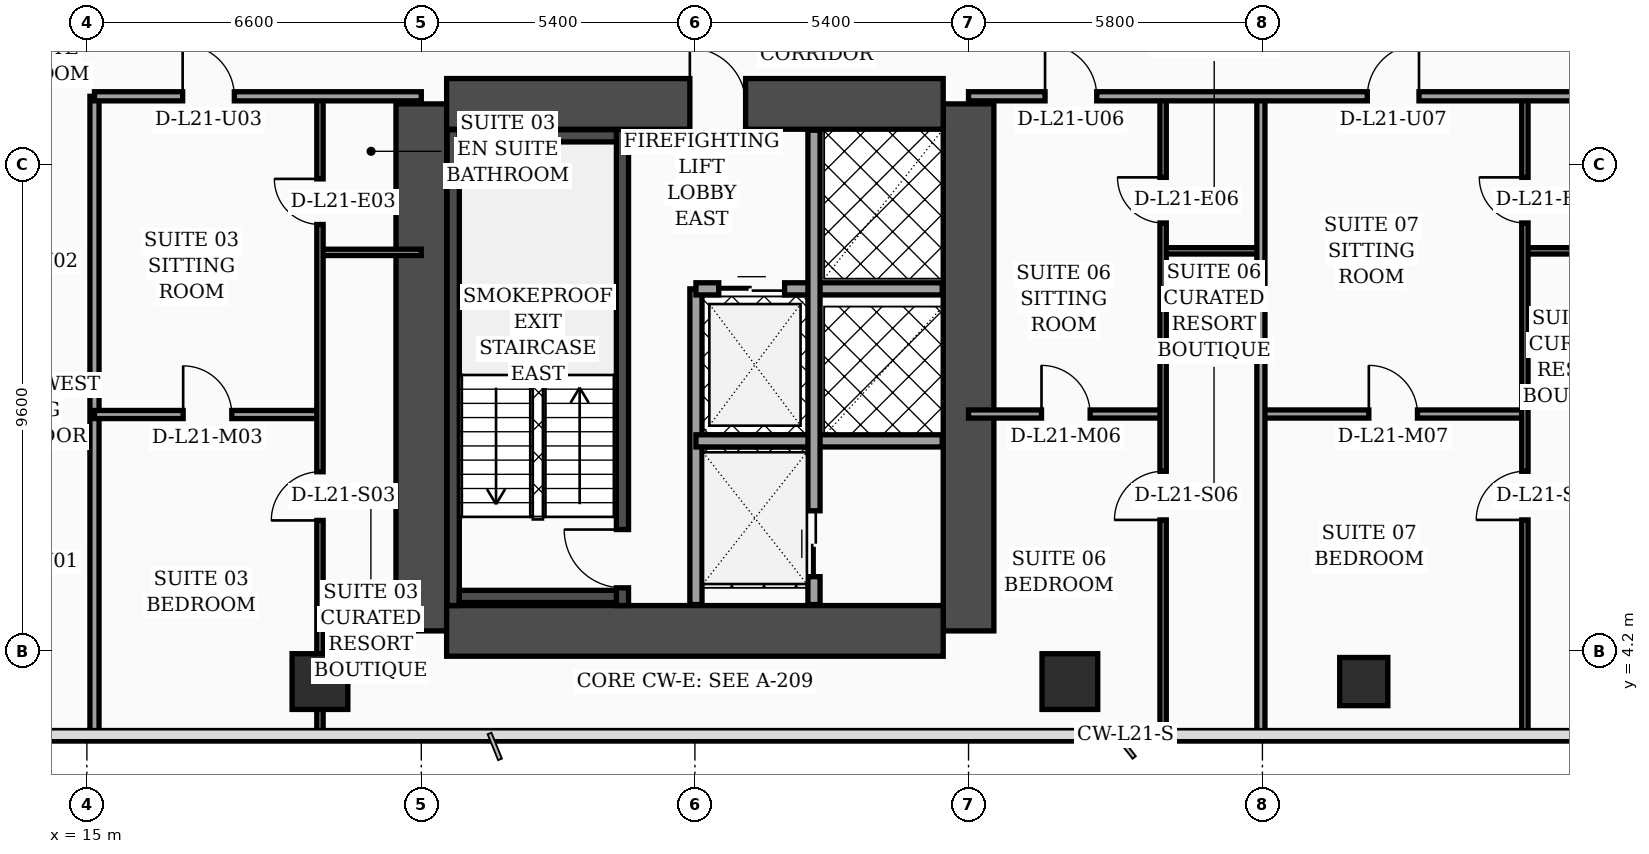
"""IFC4 building model, lengths in metres.
Left out: names, types, materials, properties, quantities, classifications, styles, units other than length and angle.
Written with IfcOpenShell. Run it as: python <this file> out.ifc"""

import sys

from ifc_helpers import new_model, si_unit, direction, frame, frame_2d, origin, origin_2d, place, context, subcontext, project, spatial, rectangle, hollow_rectangle, extrude, element, fill, save


model = new_model("IFC4")
c1 = context("Model", 3, precision=1e-05, world=origin(), true_north=direction((0.0, 1.0)))
c2 = subcontext(c1, "Body", "Model", "MODEL_VIEW")
j1 = project(units=[si_unit("LENGTHUNIT", "METRE"), si_unit("PLANEANGLEUNIT", "RADIAN")], contexts=[c1])
p1 = place(None, origin())
s1 = spatial("IfcSite", under=j1, at=p1, CompositionType="ELEMENT")
p2 = place(p1, origin())
s2 = spatial("IfcBuilding", under=s1, at=p2, CompositionType="ELEMENT")
p3 = place(p2, frame((0.0, 0.0, 88.8)))
s3 = spatial("IfcBuildingStorey", under=s2, at=p3, CompositionType="ELEMENT", Elevation=88.8)
for number, where, z_axis, x_axis in (
    (1, (21.6, 4.6, 0.0), (0.0, 0.0, 1.0), (0.0, 1.0, 0.0)),
    (2, (32.4, 4.6, 0.0), (0.0, 0.0, 1.0), (0.0, 1.0, 0.0)),
):
    element("IfcWall", number, at=place(p3, frame(where, z_axis=z_axis, x_axis=x_axis)), inside=s3, PredefinedType="SHEAR", context=c2, shape_type="SweptSolid", body=[
        extrude(rectangle(XDim=10.4, YDim=1.0, at=frame_2d((5.2, 0.0))), origin(), (0.0, 0.0, 1.0), 3.52),
    ])
p4 = place(p3, frame((22.1, 15.0, 0.0), z_axis=(0.0, 0.0, 1.0), x_axis=(1.0, 0.0, 0.0)))
e3 = element("IfcWall", 3, at=p4, inside=s3, PredefinedType="SHEAR", context=c2, shape_type="SweptSolid", body=[
    extrude(rectangle(XDim=9.8, YDim=1.0, at=frame_2d((4.9, 0.0))), origin(), (0.0, 0.0, 1.0), 3.52),
])
p5 = place(p4, frame((4.8, 0.0, 0.0)))
e4 = element("IfcOpeningElement", 4, at=p5, cuts=e3, PredefinedType="OPENING", context=c2, shape_type="SweptSolid", body=[
    extrude(rectangle(XDim=1.1, YDim=2.2, at=frame_2d((0.55, 1.1))), frame((0.0, 0.51, 0.0), z_axis=(0.0, -1.0, 0.0), x_axis=(1.0, 0.0, 0.0)), (0.0, 0.0, 1.0), 1.02),
])
p6 = place(p3, frame((22.1, 4.6, 0.0), z_axis=(0.0, 0.0, 1.0), x_axis=(1.0, 0.0, 0.0)))
e5 = element("IfcWall", 5, at=p6, inside=s3, PredefinedType="SHEAR", context=c2, shape_type="SweptSolid", body=[
    extrude(rectangle(XDim=9.8, YDim=1.0, at=frame_2d((4.9, 0.0))), origin(), (0.0, 0.0, 1.0), 3.52),
])
p7 = place(p3, frame((22.23, 5.1, 0.0), z_axis=(0.0, 0.0, 1.0), x_axis=(0.0, 1.0, 0.0)))
e6 = element("IfcWall", 6, at=p7, inside=s3, PredefinedType="SOLIDWALL", context=c2, shape_type="SweptSolid", body=[
    extrude(rectangle(XDim=9.39, YDim=0.24, at=frame_2d((4.695, 0.0))), origin(), (0.0, 0.0, 1.0), 3.52),
])
p8 = place(p3, frame((25.57, 5.1, 0.0), z_axis=(0.0, 0.0, 1.0), x_axis=(0.0, 1.0, 0.0)))
e7 = element("IfcWall", 7, at=p8, inside=s3, PredefinedType="SOLIDWALL", context=c2, shape_type="SweptSolid", body=[
    extrude(rectangle(XDim=9.39, YDim=0.24, at=frame_2d((4.695, 0.0))), origin(), (0.0, 0.0, 1.0), 3.52),
])
p9 = place(p8, frame((0.35, 0.0, 0.0)))
e8 = element("IfcOpeningElement", 8, at=p9, cuts=e7, PredefinedType="OPENING", context=c2, shape_type="SweptSolid", body=[
    extrude(rectangle(XDim=1.15, YDim=2.2, at=frame_2d((0.575, 1.1))), frame((0.0, 0.13, 0.0), z_axis=(0.0, -1.0, 0.0), x_axis=(1.0, 0.0, 0.0)), (0.0, 0.0, 1.0), 0.26),
])
for number, where, z_axis, x_axis in (
    (9, (22.35, 5.28, 0.0), (0.0, 0.0, 1.0), (1.0, 0.0, 0.0)),
    (10, (22.35, 14.37, 0.0), (0.0, 0.0, 1.0), (1.0, 0.0, 0.0)),
):
    element("IfcWall", number, at=place(p3, frame(where, z_axis=z_axis, x_axis=x_axis)), inside=s3, PredefinedType="SOLIDWALL", context=c2, shape_type="SweptSolid", body=[
        extrude(rectangle(XDim=3.1, YDim=0.24, at=frame_2d((1.55, 0.0))), origin(), (0.0, 0.0, 1.0), 3.52),
    ])
for number, where, z_axis, x_axis in (
    (11, (19.6, 3.6, 0.0), (0.0, 0.0, 1.0), (1.0, 0.0, 0.0)),
    (12, (34.4, 3.6, 0.0), (0.0, 0.0, 1.0), (1.0, 0.0, 0.0)),
):
    element("IfcColumn", number, at=place(p3, frame(where, z_axis=z_axis, x_axis=x_axis)), inside=s3, PredefinedType="COLUMN", context=c2, shape_type="SweptSolid", body=[
        extrude(hollow_rectangle(XDim=1.1, YDim=1.1, WallThickness=0.045, at=origin_2d()), origin(), (0.0, 0.0, 1.0), 3.52),
    ])
p10 = place(p3, frame((40.2, 3.6, 0.0), z_axis=(0.0, 0.0, 1.0), x_axis=(1.0, 0.0, 0.0)))
e13 = element("IfcColumn", 13, at=p10, inside=s3, PredefinedType="COLUMN", context=c2, shape_type="SweptSolid", body=[
    extrude(hollow_rectangle(XDim=0.95, YDim=0.95, WallThickness=0.04, at=origin_2d()), origin(), (0.0, 0.0, 1.0), 3.52),
])
p11 = place(p3, frame((27.02, 5.12, 0.0), z_axis=(0.0, 0.0, 1.0), x_axis=(0.0, 1.0, 0.0)))
e14 = element("IfcWall", 14, at=p11, inside=s3, PredefinedType="SOLIDWALL", context=c2, shape_type="SweptSolid", body=[
    extrude(rectangle(XDim=6.23, YDim=0.24, at=frame_2d((3.115, 0.0))), origin(), (0.0, 0.0, 1.0), 3.52),
])
p12 = place(p3, frame((27.02, 11.35, 0.0), z_axis=(0.0, 0.0, 1.0), x_axis=(1.0, 0.0, 0.0)))
e15 = element("IfcWall", 15, at=p12, inside=s3, PredefinedType="SOLIDWALL", context=c2, shape_type="SweptSolid", body=[
    extrude(rectangle(XDim=4.86, YDim=0.24, at=frame_2d((2.43, 0.0))), origin(), (0.0, 0.0, 1.0), 3.52),
])
p13 = place(p12, frame((0.45, 0.0, 0.0)))
e16 = element("IfcOpeningElement", 16, at=p13, cuts=e15, PredefinedType="OPENING", context=c2, shape_type="SweptSolid", body=[
    extrude(rectangle(XDim=1.3, YDim=2.35, at=frame_2d((0.65, 1.175))), frame((0.0, 0.13, 0.0), z_axis=(0.0, -1.0, 0.0), x_axis=(1.0, 0.0, 0.0)), (0.0, 0.0, 1.0), 0.26),
])
p14 = place(p3, frame((27.02, 8.35, 0.0), z_axis=(0.0, 0.0, 1.0), x_axis=(1.0, 0.0, 0.0)))
e17 = element("IfcWall", 17, at=p14, inside=s3, PredefinedType="SOLIDWALL", context=c2, shape_type="SweptSolid", body=[
    extrude(rectangle(XDim=4.86, YDim=0.24, at=frame_2d((2.43, 0.0))), origin(), (0.0, 0.0, 1.0), 3.52),
])
p15 = place(p3, frame((29.35, 5.12, 0.0), z_axis=(0.0, 0.0, 1.0), x_axis=(0.0, 1.0, 0.0)))
e18 = element("IfcWall", 18, at=p15, inside=s3, PredefinedType="SOLIDWALL", context=c2, shape_type="SweptSolid", body=[
    extrude(rectangle(XDim=9.36, YDim=0.24, at=frame_2d((4.68, 0.0))), origin(), (0.0, 0.0, 1.0), 3.52),
])
p16 = place(p15, frame((0.55, 0.0, 0.0)))
e19 = element("IfcOpeningElement", 19, at=p16, cuts=e18, PredefinedType="OPENING", context=c2, shape_type="SweptSolid", body=[
    extrude(rectangle(XDim=1.3, YDim=2.35, at=frame_2d((0.65, 1.175))), frame((0.0, 0.13, 0.0), z_axis=(0.0, -1.0, 0.0), x_axis=(1.0, 0.0, 0.0)), (0.0, 0.0, 1.0), 0.26),
])
p17 = place(p3, frame((15.15, 2.44, 0.0), z_axis=(0.0, 0.0, 1.0), x_axis=(0.0, 1.0, 0.0)))
e20 = element("IfcWall", 20, at=p17, inside=s3, PredefinedType="PARTITIONING", context=c2, shape_type="SweptSolid", body=[
    extrude(rectangle(XDim=12.71, YDim=0.18, at=frame_2d((6.355, 0.0))), origin(), (0.0, 0.0, 1.0), 3.02),
])
p18 = place(p3, frame((19.6, 12.07, 0.0), z_axis=(0.0, 0.0, 1.0), x_axis=(1.0, 0.0, 0.0)))
e21 = element("IfcWall", 21, at=p18, inside=s3, PredefinedType="PARTITIONING", context=c2, shape_type="SweptSolid", body=[
    extrude(rectangle(XDim=2.0, YDim=0.125, at=frame_2d((1.0, 0.0))), origin(), (0.0, 0.0, 1.0), 3.52),
])
p19 = place(p3, frame((15.15, 8.87, 0.0), z_axis=(0.0, 0.0, 1.0), x_axis=(1.0, 0.0, 0.0)))
e22 = element("IfcWall", 22, at=p19, inside=s3, PredefinedType="PARTITIONING", context=c2, shape_type="SweptSolid", body=[
    extrude(rectangle(XDim=4.45, YDim=0.16, at=frame_2d((2.225, 0.0))), origin(), (0.0, 0.0, 1.0), 3.52),
])
p20 = place(p19, frame((1.75, 0.0, 0.0)))
e23 = element("IfcOpeningElement", 23, at=p20, cuts=e22, PredefinedType="OPENING", context=c2, shape_type="SweptSolid", body=[
    extrude(rectangle(XDim=0.96, YDim=2.2, at=frame_2d((0.48, 1.1))), frame((0.0, 0.09, 0.0), z_axis=(0.0, -1.0, 0.0), x_axis=(1.0, 0.0, 0.0)), (0.0, 0.0, 1.0), 0.18),
])
p21 = place(p3, frame((19.6, 2.44, 0.0), z_axis=(0.0, 0.0, 1.0), x_axis=(0.0, 1.0, 0.0)))
e24 = element("IfcWall", 24, at=p21, inside=s3, PredefinedType="PARTITIONING", context=c2, shape_type="SweptSolid", body=[
    extrude(rectangle(XDim=12.71, YDim=0.125, at=frame_2d((6.355, 0.0))), origin(), (0.0, 0.0, 1.0), 2.32),
])
p22 = place(p21, frame((4.34, 0.0, 0.0)))
e25 = element("IfcOpeningElement", 25, at=p22, cuts=e24, PredefinedType="OPENING", context=c2, shape_type="SweptSolid", body=[
    extrude(rectangle(XDim=0.96, YDim=2.2, at=frame_2d((0.48, 1.1))), frame((0.0, 0.073, 0.0), z_axis=(0.0, -1.0, 0.0), x_axis=(1.0, 0.0, 0.0)), (0.0, 0.0, 1.0), 0.145),
])
p23 = place(p21, frame((10.18, 0.0, 0.0)))
e26 = element("IfcOpeningElement", 26, at=p23, cuts=e24, PredefinedType="OPENING", context=c2, shape_type="SweptSolid", body=[
    extrude(rectangle(XDim=0.9, YDim=2.15, at=frame_2d((0.45, 1.075))), frame((0.0, 0.073, 0.0), z_axis=(0.0, -1.0, 0.0), x_axis=(1.0, 0.0, 0.0)), (0.0, 0.0, 1.0), 0.145),
])
p24 = place(p3, frame((15.15, 15.15, 0.0), z_axis=(0.0, 0.0, 1.0), x_axis=(1.0, 0.0, 0.0)))
e27 = element("IfcWall", 27, at=p24, inside=s3, PredefinedType="PARTITIONING", context=c2, shape_type="SweptSolid", body=[
    extrude(rectangle(XDim=6.45, YDim=0.18, at=frame_2d((3.225, 0.0))), origin(), (0.0, 0.0, 1.0), 2.32),
])
p25 = place(p24, frame((1.74, 0.0, 0.0)))
e28 = element("IfcOpeningElement", 28, at=p25, cuts=e27, PredefinedType="OPENING", context=c2, shape_type="SweptSolid", body=[
    extrude(rectangle(XDim=1.02, YDim=2.2, at=frame_2d((0.51, 1.1))), frame((0.0, 0.1, 0.0), z_axis=(0.0, -1.0, 0.0), x_axis=(1.0, 0.0, 0.0)), (0.0, 0.0, 1.0), 0.2),
])
p26 = place(p3, frame((36.24, 12.1, 0.0), z_axis=(0.0, 0.0, 1.0), x_axis=(1.0, 0.0, 0.0)))
e29 = element("IfcWall", 29, at=p26, inside=s3, PredefinedType="PARTITIONING", context=c2, shape_type="SweptSolid", body=[
    extrude(rectangle(XDim=1.93, YDim=0.125, at=frame_2d((0.965, 0.0))), origin(), (0.0, 0.0, 1.0), 3.52),
])
p27 = place(p3, frame((32.4, 8.88, 0.0), z_axis=(0.0, 0.0, 1.0), x_axis=(1.0, 0.0, 0.0)))
e30 = element("IfcWall", 30, at=p27, inside=s3, PredefinedType="PARTITIONING", context=c2, shape_type="SweptSolid", body=[
    extrude(rectangle(XDim=3.84, YDim=0.16, at=frame_2d((1.92, 0.0))), origin(), (0.0, 0.0, 1.0), 2.82),
])
p28 = place(p27, frame((1.44, 0.0, 0.0)))
e31 = element("IfcOpeningElement", 31, at=p28, cuts=e30, PredefinedType="OPENING", context=c2, shape_type="SweptSolid", body=[
    extrude(rectangle(XDim=0.96, YDim=2.2, at=frame_2d((0.48, 1.1))), frame((0.0, 0.09, 0.0), z_axis=(0.0, -1.0, 0.0), x_axis=(1.0, 0.0, 0.0)), (0.0, 0.0, 1.0), 0.18),
])
p29 = place(p3, frame((36.24, 2.44, 0.0), z_axis=(0.0, 0.0, 1.0), x_axis=(0.0, 1.0, 0.0)))
e32 = element("IfcWall", 32, at=p29, inside=s3, PredefinedType="PARTITIONING", context=c2, shape_type="SweptSolid", body=[
    extrude(rectangle(XDim=12.71, YDim=0.125, at=frame_2d((6.355, 0.0))), origin(), (0.0, 0.0, 1.0), 2.82),
])
p30 = place(p29, frame((4.35, 0.0, 0.0)))
e33 = element("IfcOpeningElement", 33, at=p30, cuts=e32, PredefinedType="OPENING", context=c2, shape_type="SweptSolid", body=[
    extrude(rectangle(XDim=0.96, YDim=2.2, at=frame_2d((0.48, 1.1))), frame((0.0, 0.073, 0.0), z_axis=(0.0, -1.0, 0.0), x_axis=(1.0, 0.0, 0.0)), (0.0, 0.0, 1.0), 0.145),
])
p31 = place(p29, frame((10.21, 0.0, 0.0)))
e34 = element("IfcOpeningElement", 34, at=p31, cuts=e32, PredefinedType="OPENING", context=c2, shape_type="SweptSolid", body=[
    extrude(rectangle(XDim=0.9, YDim=2.15, at=frame_2d((0.45, 1.075))), frame((0.0, 0.073, 0.0), z_axis=(0.0, -1.0, 0.0), x_axis=(1.0, 0.0, 0.0)), (0.0, 0.0, 1.0), 0.145),
])
p32 = place(p3, frame((43.38, 12.1, 0.0), z_axis=(0.0, 0.0, 1.0), x_axis=(1.0, 0.0, 0.0)))
e35 = element("IfcWall", 35, at=p32, inside=s3, PredefinedType="PARTITIONING", context=c2, shape_type="SweptSolid", body=[
    extrude(rectangle(XDim=2.07, YDim=0.125, at=frame_2d((1.035, 0.0))), origin(), (0.0, 0.0, 1.0), 3.52),
])
p33 = place(p3, frame((38.17, 8.88, 0.0), z_axis=(0.0, 0.0, 1.0), x_axis=(1.0, 0.0, 0.0)))
e36 = element("IfcWall", 36, at=p33, inside=s3, PredefinedType="PARTITIONING", context=c2, shape_type="SweptSolid", body=[
    extrude(rectangle(XDim=5.21, YDim=0.16, at=frame_2d((2.605, 0.0))), origin(), (0.0, 0.0, 1.0), 3.52),
])
p34 = place(p33, frame((2.13, 0.0, 0.0)))
e37 = element("IfcOpeningElement", 37, at=p34, cuts=e36, PredefinedType="OPENING", context=c2, shape_type="SweptSolid", body=[
    extrude(rectangle(XDim=0.96, YDim=2.2, at=frame_2d((0.48, 1.1))), frame((0.0, 0.09, 0.0), z_axis=(0.0, -1.0, 0.0), x_axis=(1.0, 0.0, 0.0)), (0.0, 0.0, 1.0), 0.18),
])
p35 = place(p3, frame((43.38, 2.44, 0.0), z_axis=(0.0, 0.0, 1.0), x_axis=(0.0, 1.0, 0.0)))
e38 = element("IfcWall", 38, at=p35, inside=s3, PredefinedType="PARTITIONING", context=c2, shape_type="SweptSolid", body=[
    extrude(rectangle(XDim=12.71, YDim=0.125, at=frame_2d((6.355, 0.0))), origin(), (0.0, 0.0, 1.0), 3.02),
])
p36 = place(p35, frame((4.35, 0.0, 0.0)))
e39 = element("IfcOpeningElement", 39, at=p36, cuts=e38, PredefinedType="OPENING", context=c2, shape_type="SweptSolid", body=[
    extrude(rectangle(XDim=0.96, YDim=2.2, at=frame_2d((0.48, 1.1))), frame((0.0, 0.073, 0.0), z_axis=(0.0, -1.0, 0.0), x_axis=(1.0, 0.0, 0.0)), (0.0, 0.0, 1.0), 0.145),
])
p37 = place(p35, frame((10.21, 0.0, 0.0)))
e40 = element("IfcOpeningElement", 40, at=p37, cuts=e38, PredefinedType="OPENING", context=c2, shape_type="SweptSolid", body=[
    extrude(rectangle(XDim=0.9, YDim=2.15, at=frame_2d((0.45, 1.075))), frame((0.0, 0.073, 0.0), z_axis=(0.0, -1.0, 0.0), x_axis=(1.0, 0.0, 0.0)), (0.0, 0.0, 1.0), 0.145),
])
p38 = place(p3, frame((38.17, 2.44, 0.0), z_axis=(0.0, 0.0, 1.0), x_axis=(0.0, 1.0, 0.0)))
e41 = element("IfcWall", 41, at=p38, inside=s3, PredefinedType="PARTITIONING", context=c2, shape_type="SweptSolid", body=[
    extrude(rectangle(XDim=12.71, YDim=0.16, at=frame_2d((6.355, 0.0))), origin(), (0.0, 0.0, 1.0), 2.82),
])
p39 = place(p3, frame((32.4, 15.15, 0.0), z_axis=(0.0, 0.0, 1.0), x_axis=(1.0, 0.0, 0.0)))
e42 = element("IfcWall", 42, at=p39, inside=s3, PredefinedType="PARTITIONING", context=c2, shape_type="SweptSolid", body=[
    extrude(rectangle(XDim=13.05, YDim=0.18, at=frame_2d((6.525, 0.0))), origin(), (0.0, 0.0, 1.0), 2.82),
])
p40 = place(p39, frame((1.51, 0.0, 0.0)))
e43 = element("IfcOpeningElement", 43, at=p40, cuts=e42, PredefinedType="OPENING", context=c2, shape_type="SweptSolid", body=[
    extrude(rectangle(XDim=1.02, YDim=2.2, at=frame_2d((0.51, 1.1))), frame((0.0, 0.1, 0.0), z_axis=(0.0, -1.0, 0.0), x_axis=(1.0, 0.0, 0.0)), (0.0, 0.0, 1.0), 0.2),
])
p41 = place(p39, frame((7.87, 0.0, 0.0)))
e44 = element("IfcOpeningElement", 44, at=p41, cuts=e42, PredefinedType="OPENING", context=c2, shape_type="SweptSolid", body=[
    extrude(rectangle(XDim=1.02, YDim=2.2, at=frame_2d((0.51, 1.1))), frame((0.0, 0.1, 0.0), z_axis=(0.0, -1.0, 0.0), x_axis=(1.0, 0.0, 0.0)), (0.0, 0.0, 1.0), 0.2),
])
p42 = place(p13, origin())
e45 = element("IfcDoor", 45, at=p42, inside=s3, OperationType="DOUBLE_DOOR_SLIDING", PredefinedType="DOOR", context=c2, shape_type="SweptSolid", body=[
    extrude(rectangle(XDim=1.3, YDim=2.35, at=frame_2d((0.65, 1.175))), frame((0.0, 0.025, 0.0), z_axis=(0.0, -1.0, 0.0), x_axis=(1.0, 0.0, 0.0)), (0.0, 0.0, 1.0), 0.05),
])
fill(e16, e45)
p43 = place(p16, origin())
e46 = element("IfcDoor", 46, at=p43, inside=s3, OperationType="DOUBLE_DOOR_SLIDING", PredefinedType="DOOR", context=c2, shape_type="SweptSolid", body=[
    extrude(rectangle(XDim=1.3, YDim=2.35, at=frame_2d((0.65, 1.175))), frame((0.0, 0.025, 0.0), z_axis=(0.0, -1.0, 0.0), x_axis=(1.0, 0.0, 0.0)), (0.0, 0.0, 1.0), 0.05),
])
fill(e19, e46)
p44 = place(p20, origin())
e47 = element("IfcDoor", 47, at=p44, inside=s3, OperationType="SINGLE_SWING_LEFT", PredefinedType="DOOR", context=c2, shape_type="SweptSolid", body=[
    extrude(rectangle(XDim=0.96, YDim=2.2, at=frame_2d((0.48, 1.1))), frame((0.0, 0.025, 0.0), z_axis=(0.0, -1.0, 0.0), x_axis=(1.0, 0.0, 0.0)), (0.0, 0.0, 1.0), 0.05),
])
fill(e23, e47)
p45 = place(p22, origin())
e48 = element("IfcDoor", 48, at=p45, inside=s3, OperationType="SINGLE_SWING_LEFT", PredefinedType="DOOR", context=c2, shape_type="SweptSolid", body=[
    extrude(rectangle(XDim=0.96, YDim=2.2, at=frame_2d((0.48, 1.1))), frame((0.0, 0.025, 0.0), z_axis=(0.0, -1.0, 0.0), x_axis=(1.0, 0.0, 0.0)), (0.0, 0.0, 1.0), 0.05),
])
fill(e25, e48)
p46 = place(p23, origin())
e49 = element("IfcDoor", 49, at=p46, inside=s3, OperationType="SINGLE_SWING_RIGHT", PredefinedType="DOOR", context=c2, shape_type="SweptSolid", body=[
    extrude(rectangle(XDim=0.9, YDim=2.15, at=frame_2d((0.45, 1.075))), frame((0.0, 0.025, 0.0), z_axis=(0.0, -1.0, 0.0), x_axis=(1.0, 0.0, 0.0)), (0.0, 0.0, 1.0), 0.05),
])
fill(e26, e49)
p47 = place(p25, origin())
e50 = element("IfcDoor", 50, at=p47, inside=s3, OperationType="SINGLE_SWING_LEFT", PredefinedType="DOOR", context=c2, shape_type="SweptSolid", body=[
    extrude(rectangle(XDim=1.02, YDim=2.2, at=frame_2d((0.51, 1.1))), frame((0.0, 0.025, 0.0), z_axis=(0.0, -1.0, 0.0), x_axis=(1.0, 0.0, 0.0)), (0.0, 0.0, 1.0), 0.05),
])
fill(e28, e50)
p48 = place(p28, origin())
e51 = element("IfcDoor", 51, at=p48, inside=s3, OperationType="SINGLE_SWING_LEFT", PredefinedType="DOOR", context=c2, shape_type="SweptSolid", body=[
    extrude(rectangle(XDim=0.96, YDim=2.2, at=frame_2d((0.48, 1.1))), frame((0.0, 0.025, 0.0), z_axis=(0.0, -1.0, 0.0), x_axis=(1.0, 0.0, 0.0)), (0.0, 0.0, 1.0), 0.05),
])
fill(e31, e51)
p49 = place(p30, origin())
e52 = element("IfcDoor", 52, at=p49, inside=s3, OperationType="SINGLE_SWING_LEFT", PredefinedType="DOOR", context=c2, shape_type="SweptSolid", body=[
    extrude(rectangle(XDim=0.96, YDim=2.2, at=frame_2d((0.48, 1.1))), frame((0.0, 0.025, 0.0), z_axis=(0.0, -1.0, 0.0), x_axis=(1.0, 0.0, 0.0)), (0.0, 0.0, 1.0), 0.05),
])
fill(e33, e52)
p50 = place(p31, origin())
e53 = element("IfcDoor", 53, at=p50, inside=s3, OperationType="SINGLE_SWING_RIGHT", PredefinedType="DOOR", context=c2, shape_type="SweptSolid", body=[
    extrude(rectangle(XDim=0.9, YDim=2.15, at=frame_2d((0.45, 1.075))), frame((0.0, 0.025, 0.0), z_axis=(0.0, -1.0, 0.0), x_axis=(1.0, 0.0, 0.0)), (0.0, 0.0, 1.0), 0.05),
])
fill(e34, e53)
p51 = place(p34, origin())
e54 = element("IfcDoor", 54, at=p51, inside=s3, OperationType="SINGLE_SWING_LEFT", PredefinedType="DOOR", context=c2, shape_type="SweptSolid", body=[
    extrude(rectangle(XDim=0.96, YDim=2.2, at=frame_2d((0.48, 1.1))), frame((0.0, 0.025, 0.0), z_axis=(0.0, -1.0, 0.0), x_axis=(1.0, 0.0, 0.0)), (0.0, 0.0, 1.0), 0.05),
])
fill(e37, e54)
p52 = place(p36, origin())
e55 = element("IfcDoor", 55, at=p52, inside=s3, OperationType="SINGLE_SWING_LEFT", PredefinedType="DOOR", context=c2, shape_type="SweptSolid", body=[
    extrude(rectangle(XDim=0.96, YDim=2.2, at=frame_2d((0.48, 1.1))), frame((0.0, 0.025, 0.0), z_axis=(0.0, -1.0, 0.0), x_axis=(1.0, 0.0, 0.0)), (0.0, 0.0, 1.0), 0.05),
])
fill(e39, e55)
p53 = place(p37, origin())
e56 = element("IfcDoor", 56, at=p53, inside=s3, OperationType="SINGLE_SWING_RIGHT", PredefinedType="DOOR", context=c2, shape_type="SweptSolid", body=[
    extrude(rectangle(XDim=0.9, YDim=2.15, at=frame_2d((0.45, 1.075))), frame((0.0, 0.025, 0.0), z_axis=(0.0, -1.0, 0.0), x_axis=(1.0, 0.0, 0.0)), (0.0, 0.0, 1.0), 0.05),
])
fill(e40, e56)
p54 = place(p40, origin())
e57 = element("IfcDoor", 57, at=p54, inside=s3, OperationType="SINGLE_SWING_LEFT", PredefinedType="DOOR", context=c2, shape_type="SweptSolid", body=[
    extrude(rectangle(XDim=1.02, YDim=2.2, at=frame_2d((0.51, 1.1))), frame((0.0, 0.025, 0.0), z_axis=(0.0, -1.0, 0.0), x_axis=(1.0, 0.0, 0.0)), (0.0, 0.0, 1.0), 0.05),
])
fill(e43, e57)
p55 = place(p41, origin())
e58 = element("IfcDoor", 58, at=p55, inside=s3, OperationType="SINGLE_SWING_RIGHT", PredefinedType="DOOR", context=c2, shape_type="SweptSolid", body=[
    extrude(rectangle(XDim=1.02, YDim=2.2, at=frame_2d((0.51, 1.1))), frame((0.0, 0.025, 0.0), z_axis=(0.0, -1.0, 0.0), x_axis=(1.0, 0.0, 0.0)), (0.0, 0.0, 1.0), 0.05),
])
fill(e44, e58)
p56 = place(p9, origin())
e59 = element("IfcDoor", 59, at=p56, inside=s3, OperationType="SINGLE_SWING_RIGHT", PredefinedType="DOOR", context=c2, shape_type="SweptSolid", body=[
    extrude(rectangle(XDim=1.15, YDim=2.2, at=frame_2d((0.575, 1.1))), frame((0.0, 0.025, 0.0), z_axis=(0.0, -1.0, 0.0), x_axis=(1.0, 0.0, 0.0)), (0.0, 0.0, 1.0), 0.05),
])
fill(e8, e59)
p57 = place(p5, origin())
e60 = element("IfcDoor", 60, at=p57, inside=s3, OperationType="SINGLE_SWING_LEFT", PredefinedType="DOOR", context=c2, shape_type="SweptSolid", body=[
    extrude(rectangle(XDim=1.1, YDim=2.2, at=frame_2d((0.55, 1.1))), frame((0.0, 0.025, 0.0), z_axis=(0.0, -1.0, 0.0), x_axis=(1.0, 0.0, 0.0)), (0.0, 0.0, 1.0), 0.05),
])
fill(e4, e60)
save(model, sys.argv[1])
